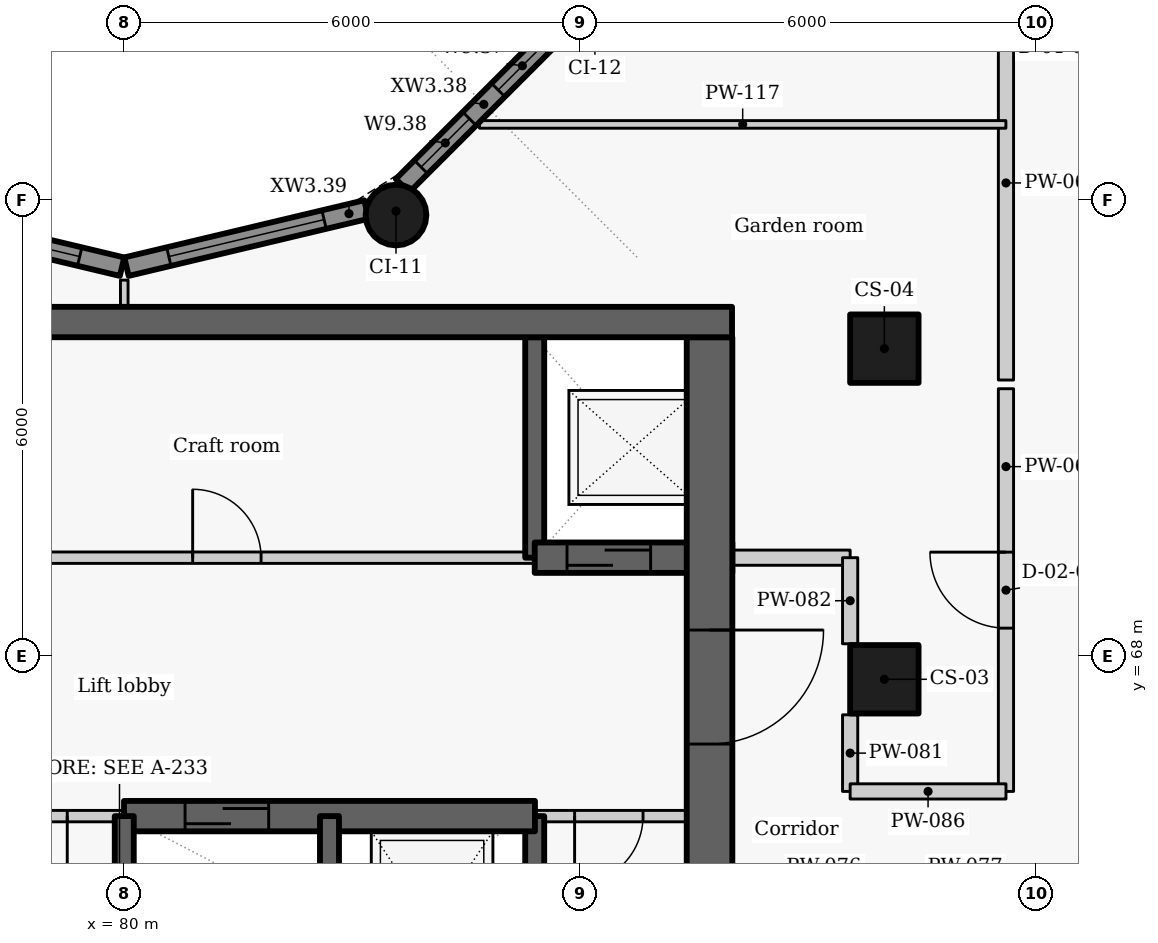
"""IFC4 building model, lengths in metres.
Left out: names, types, materials, properties, quantities, classifications, styles, units other than length and angle.
Written with IfcOpenShell. Run it as: python <this file> out.ifc"""

import sys

from ifc_helpers import new_model, si_unit, direction, frame, frame_2d, origin, origin_2d, place, context, subcontext, project, spatial, rectangle, circle, extrude, element, fill, save


model = new_model("IFC4")
c1 = context("Model", 3, precision=1e-05, world=origin(), true_north=direction((0.0, 1.0)))
c2 = subcontext(c1, "Body", "Model", "MODEL_VIEW")
j1 = project(units=[si_unit("LENGTHUNIT", "METRE"), si_unit("PLANEANGLEUNIT", "RADIAN")], contexts=[c1])
p1 = place(None, origin())
s1 = spatial("IfcSite", under=j1, at=p1, CompositionType="ELEMENT")
p2 = place(p1, origin())
s2 = spatial("IfcBuilding", under=s1, at=p2, CompositionType="ELEMENT")
p3 = place(p2, frame((0.0, 0.0, 183.3)))
s3 = spatial("IfcBuildingStorey", under=s2, at=p3, CompositionType="ELEMENT", Elevation=183.3)
for number, where, z_axis, x_axis in (
    (1, (90.0, 67.7, 0.0), (0.0, 0.0, 1.0), (0.0, 1.0, 0.0)),
    (2, (90.0, 72.05, 0.0), (0.0, 0.0, 1.0), (0.0, 1.0, 0.0)),
):
    element("IfcColumn", number, at=place(p3, frame(where, z_axis=z_axis, x_axis=x_axis)), inside=s3, PredefinedType="COLUMN", context=c2, shape_type="SweptSolid", body=[
        extrude(rectangle(XDim=0.9, YDim=0.9, at=origin_2d()), origin(), (0.0, 0.0, 1.0), 3.3),
    ])
p4 = place(p3, frame((83.575, 73.808, 0.0), z_axis=(0.0, 0.0, 1.0), x_axis=(0.866025403784, 0.5, 0.0)))
e3 = element("IfcColumn", 3, at=p4, inside=s3, PredefinedType="COLUMN", context=c2, shape_type="SweptSolid", body=[
    extrude(circle(Radius=0.4, at=origin_2d()), origin(), (0.0, 0.0, 1.0), 3.3),
])
p5 = place(p3, frame((85.806, 76.339, 0.0), z_axis=(0.0, 0.0, 1.0), x_axis=(-0.707106781187, -0.707106781187, 0.0)))
e4 = element("IfcWall", 4, at=p5, inside=s3, PredefinedType="SOLIDWALL", context=c2, shape_type="SweptSolid", body=[
    extrude(rectangle(XDim=3.033, YDim=0.25, at=frame_2d((1.517, 0.0))), origin(), (0.0, 0.0, 1.0), 2.425),
])
p6 = place(p5, frame((0.353, 0.0, 0.9)))
e5 = element("IfcOpeningElement", 5, at=p6, cuts=e4, PredefinedType="OPENING", context=c2, shape_type="SweptSolid", body=[
    extrude(rectangle(XDim=0.9, YDim=1.1, at=frame_2d((0.45, 0.55))), frame((0.0, 0.135, 0.0), z_axis=(0.0, -1.0, 0.0), x_axis=(1.0, 0.0, 0.0)), (0.0, 0.0, 1.0), 0.27),
])
p7 = place(p5, frame((1.788, 0.0, 0.9)))
e6 = element("IfcOpeningElement", 6, at=p7, cuts=e4, PredefinedType="OPENING", context=c2, shape_type="SweptSolid", body=[
    extrude(rectangle(XDim=0.9, YDim=1.1, at=frame_2d((0.45, 0.55))), frame((0.0, 0.135, 0.0), z_axis=(0.0, -1.0, 0.0), x_axis=(1.0, 0.0, 0.0)), (0.0, 0.0, 1.0), 0.27),
])
p8 = place(p3, frame((83.186, 73.881, 0.0), z_axis=(0.0, 0.0, 1.0), x_axis=(-0.972773113459, -0.231759508395, 0.0)))
e7 = element("IfcWall", 7, at=p8, inside=s3, PredefinedType="SOLIDWALL", context=c2, shape_type="SweptSolid", body=[
    extrude(rectangle(XDim=3.246, YDim=0.25, at=frame_2d((1.623, 0.0))), origin(), (0.0, 0.0, 1.0), 2.425),
])
p9 = place(p8, frame((0.573, 0.0, 0.9)))
e8 = element("IfcOpeningElement", 8, at=p9, cuts=e7, PredefinedType="OPENING", context=c2, shape_type="SweptSolid", body=[
    extrude(rectangle(XDim=2.1, YDim=1.1, at=frame_2d((1.05, 0.55))), frame((0.0, 0.135, 0.0), z_axis=(0.0, -1.0, 0.0), x_axis=(1.0, 0.0, 0.0)), (0.0, 0.0, 1.0), 0.27),
])
p10 = place(p3, frame((79.971, 73.128, 0.0), z_axis=(0.0, 0.0, 1.0), x_axis=(-0.972773113459, 0.231759508395, 0.0)))
e9 = element("IfcWall", 9, at=p10, inside=s3, PredefinedType="SOLIDWALL", context=c2, shape_type="SweptSolid", body=[
    extrude(rectangle(XDim=3.246, YDim=0.25, at=frame_2d((1.623, 0.0))), origin(), (0.0, 0.0, 1.0), 2.425),
])
p11 = place(p10, frame((0.573, 0.0, 0.9)))
e10 = element("IfcOpeningElement", 10, at=p11, cuts=e9, PredefinedType="OPENING", context=c2, shape_type="SweptSolid", body=[
    extrude(rectangle(XDim=2.1, YDim=1.1, at=frame_2d((1.05, 0.55))), frame((0.0, 0.135, 0.0), z_axis=(0.0, -1.0, 0.0), x_axis=(1.0, 0.0, 0.0)), (0.0, 0.0, 1.0), 0.27),
])
p12 = place(p3, frame((72.0, 69.3, 0.0), z_axis=(0.0, 0.0, 1.0), x_axis=(1.0, 0.0, 0.0)))
e11 = element("IfcWall", 11, at=p12, inside=s3, PredefinedType="PARTITIONING", context=c2, shape_type="SweptSolid", body=[
    extrude(rectangle(XDim=13.4, YDim=0.15, at=frame_2d((6.7, 0.0))), origin(), (0.0, 0.0, 1.0), 3.025),
])
p13 = place(p12, frame((1.175, 0.0, 0.0)))
e12 = element("IfcOpeningElement", 12, at=p13, cuts=e11, PredefinedType="OPENING", context=c2, shape_type="SweptSolid", body=[
    extrude(rectangle(XDim=0.9, YDim=2.1, at=frame_2d((0.45, 1.05))), frame((0.0, 0.085, 0.0), z_axis=(0.0, -1.0, 0.0), x_axis=(1.0, 0.0, 0.0)), (0.0, 0.0, 1.0), 0.17),
])
p14 = place(p12, frame((3.5, 0.0, 0.0)))
e13 = element("IfcOpeningElement", 13, at=p14, cuts=e11, PredefinedType="OPENING", context=c2, shape_type="SweptSolid", body=[
    extrude(rectangle(XDim=0.9, YDim=2.1, at=frame_2d((0.45, 1.05))), frame((0.0, 0.085, 0.0), z_axis=(0.0, -1.0, 0.0), x_axis=(1.0, 0.0, 0.0)), (0.0, 0.0, 1.0), 0.17),
])
p15 = place(p12, frame((8.9, 0.0, 0.0)))
e14 = element("IfcOpeningElement", 14, at=p15, cuts=e11, PredefinedType="OPENING", context=c2, shape_type="SweptSolid", body=[
    extrude(rectangle(XDim=0.9, YDim=2.1, at=frame_2d((0.45, 1.05))), frame((0.0, 0.085, 0.0), z_axis=(0.0, -1.0, 0.0), x_axis=(1.0, 0.0, 0.0)), (0.0, 0.0, 1.0), 0.17),
])
p16 = place(p3, frame((85.4, 63.1, -0.275), z_axis=(0.0, 0.0, 1.0), x_axis=(0.0, 1.0, 0.0)))
e15 = element("IfcWall", 15, at=p16, inside=s3, PredefinedType="SHEAR", context=c2, shape_type="SweptSolid", body=[
    extrude(rectangle(XDim=2.8, YDim=0.25, at=frame_2d((1.4, 0.0))), origin(), (0.0, 0.0, 1.0), 3.3),
])
p17 = place(p3, frame((85.4, 69.3, -0.275), z_axis=(0.0, 0.0, 1.0), x_axis=(0.0, 1.0, 0.0)))
e16 = element("IfcWall", 16, at=p17, inside=s3, PredefinedType="SHEAR", context=c2, shape_type="SweptSolid", body=[
    extrude(rectangle(XDim=2.9, YDim=0.25, at=frame_2d((1.45, 0.0))), origin(), (0.0, 0.0, 1.0), 3.3),
])
p18 = place(p3, frame((85.4, 69.3, -0.275), z_axis=(0.0, 0.0, 1.0), x_axis=(1.0, 0.0, 0.0)))
e17 = element("IfcWall", 17, at=p18, inside=s3, PredefinedType="SHEAR", context=c2, shape_type="SweptSolid", body=[
    extrude(rectangle(XDim=2.6, YDim=0.4, at=frame_2d((1.3, 0.0))), origin(), (0.0, 0.0, 1.0), 3.3),
])
p19 = place(p18, frame((0.425, 0.0, 0.275)))
e18 = element("IfcOpeningElement", 18, at=p19, cuts=e17, PredefinedType="OPENING", context=c2, shape_type="SweptSolid", body=[
    extrude(rectangle(XDim=1.1, YDim=2.1, at=frame_2d((0.55, 1.05))), frame((0.0, 0.21, 0.0), z_axis=(0.0, -1.0, 0.0), x_axis=(1.0, 0.0, 0.0)), (0.0, 0.0, 1.0), 0.42),
])
p20 = place(p3, frame((87.7, 72.2, -0.275), z_axis=(0.0, 0.0, 1.0), x_axis=(0.0, -1.0, 0.0)))
e19 = element("IfcWall", 19, at=p20, inside=s3, PredefinedType="SHEAR", context=c2, shape_type="SweptSolid", body=[
    extrude(rectangle(XDim=14.25, YDim=0.6, at=frame_2d((7.125, 0.0))), origin(), (0.0, 0.0, 1.0), 3.3),
])
p21 = place(p20, frame((3.852, 0.0, 0.275)))
e20 = element("IfcOpeningElement", 20, at=p21, cuts=e19, PredefinedType="OPENING", context=c2, shape_type="SweptSolid", body=[
    extrude(rectangle(XDim=1.5, YDim=2.1, at=frame_2d((0.75, 1.05))), frame((0.0, 0.31, 0.0), z_axis=(0.0, -1.0, 0.0), x_axis=(1.0, 0.0, 0.0)), (0.0, 0.0, 1.0), 0.62),
])
p22 = place(p3, frame((80.003, 65.9, 0.0), z_axis=(0.0, 0.0, 1.0), x_axis=(-1.0, 0.0, 0.0)))
e21 = element("IfcWall", 21, at=p22, inside=s3, PredefinedType="PARTITIONING", context=c2, shape_type="SweptSolid", body=[
    extrude(rectangle(XDim=2.706, YDim=0.15, at=frame_2d((1.353, 0.0))), origin(), (0.0, 0.0, 1.0), 3.025),
])
p23 = place(p22, frame((0.753, 0.0, 0.0)))
e22 = element("IfcOpeningElement", 22, at=p23, cuts=e21, PredefinedType="OPENING", context=c2, shape_type="SweptSolid", body=[
    extrude(rectangle(XDim=1.2, YDim=2.1, at=frame_2d((0.6, 1.05))), frame((0.0, 0.085, 0.0), z_axis=(0.0, -1.0, 0.0), x_axis=(1.0, 0.0, 0.0)), (0.0, 0.0, 1.0), 0.17),
])
p24 = place(p3, frame((88.0, 65.9, 0.0), z_axis=(0.0, 0.0, 1.0), x_axis=(-1.0, 0.0, 0.0)))
e23 = element("IfcWall", 23, at=p24, inside=s3, PredefinedType="PARTITIONING", context=c2, shape_type="SweptSolid", body=[
    extrude(rectangle(XDim=2.603, YDim=0.15, at=frame_2d((1.302, 0.0))), origin(), (0.0, 0.0, 1.0), 3.025),
])
p25 = place(p24, frame((1.175, 0.0, 0.0)))
e24 = element("IfcOpeningElement", 24, at=p25, cuts=e23, PredefinedType="OPENING", context=c2, shape_type="SweptSolid", body=[
    extrude(rectangle(XDim=0.9, YDim=2.1, at=frame_2d((0.45, 1.05))), frame((0.0, 0.085, 0.0), z_axis=(0.0, -1.0, 0.0), x_axis=(1.0, 0.0, 0.0)), (0.0, 0.0, 1.0), 0.17),
])
p26 = place(p3, frame((79.997, 65.9, -0.275), z_axis=(0.0, 0.0, 1.0), x_axis=(1.0, 0.0, 0.0)))
e25 = element("IfcWall", 25, at=p26, inside=s3, PredefinedType="SHEAR", context=c2, shape_type="SweptSolid", body=[
    extrude(rectangle(XDim=5.406, YDim=0.4, at=frame_2d((2.703, 0.0))), origin(), (0.0, 0.0, 1.0), 3.3),
])
p27 = place(p26, frame((0.803, 0.0, 0.275)))
e26 = element("IfcOpeningElement", 26, at=p27, cuts=e25, PredefinedType="OPENING", context=c2, shape_type="SweptSolid", body=[
    extrude(rectangle(XDim=1.1, YDim=2.1, at=frame_2d((0.55, 1.05))), frame((0.0, 0.21, 0.0), z_axis=(0.0, -1.0, 0.0), x_axis=(1.0, 0.0, 0.0)), (0.0, 0.0, 1.0), 0.42),
])
for number, where, z_axis, x_axis in (
    (27, (80.0, 63.1, -0.275), (0.0, 0.0, 1.0), (0.0, 1.0, 0.0)),
    (28, (82.7, 63.1, -0.275), (0.0, 0.0, 1.0), (0.0, 1.0, 0.0)),
):
    element("IfcWall", number, at=place(p3, frame(where, z_axis=z_axis, x_axis=x_axis)), inside=s3, PredefinedType="SHEAR", context=c2, shape_type="SweptSolid", body=[
        extrude(rectangle(XDim=2.8, YDim=0.25, at=frame_2d((1.4, 0.0))), origin(), (0.0, 0.0, 1.0), 3.3),
    ])
p28 = place(p3, frame((91.6, 66.225, 0.0), z_axis=(0.0, 0.0, 1.0), x_axis=(0.0, 1.0, 0.0)))
e29 = element("IfcWall", 29, at=p28, inside=s3, PredefinedType="PARTITIONING", context=c2, shape_type="SweptSolid", body=[
    extrude(rectangle(XDim=5.298, YDim=0.2, at=frame_2d((2.649, 0.0))), origin(), (0.0, 0.0, 1.0), 3.025),
])
p29 = place(p28, frame((2.148, 0.0, 0.0)))
e30 = element("IfcOpeningElement", 30, at=p29, cuts=e29, PredefinedType="OPENING", context=c2, shape_type="SweptSolid", body=[
    extrude(rectangle(XDim=1.0, YDim=2.1, at=frame_2d((0.5, 1.05))), frame((0.0, 0.11, 0.0), z_axis=(0.0, -1.0, 0.0), x_axis=(1.0, 0.0, 0.0)), (0.0, 0.0, 1.0), 0.22),
])
p30 = place(p3, frame((91.6, 71.637, 0.0), z_axis=(0.0, 0.0, 1.0), x_axis=(0.0, 1.0, 0.0)))
e31 = element("IfcWall", 31, at=p30, inside=s3, PredefinedType="PARTITIONING", context=c2, shape_type="SweptSolid", body=[
    extrude(rectangle(XDim=5.186, YDim=0.2, at=frame_2d((2.593, 0.0))), origin(), (0.0, 0.0, 1.0), 3.025),
])
p31 = place(p3, frame((88.0, 69.3, 0.0), z_axis=(0.0, 0.0, 1.0), x_axis=(1.0, 0.0, 0.0)))
e32 = element("IfcWall", 32, at=p31, inside=s3, PredefinedType="PARTITIONING", context=c2, shape_type="SweptSolid", body=[
    extrude(rectangle(XDim=1.55, YDim=0.2, at=frame_2d((0.775, 0.0))), origin(), (0.0, 0.0, 1.0), 3.025),
])
p32 = place(p3, frame((89.55, 66.225, 0.0), z_axis=(0.0, 0.0, 1.0), x_axis=(0.0, 1.0, 0.0)))
e33 = element("IfcWall", 33, at=p32, inside=s3, PredefinedType="PARTITIONING", context=c2, shape_type="SweptSolid", body=[
    extrude(rectangle(XDim=1.008, YDim=0.2, at=frame_2d((0.504, 0.0))), origin(), (0.0, 0.0, 1.0), 3.025),
])
p33 = place(p3, frame((89.55, 68.167, 0.0), z_axis=(0.0, 0.0, 1.0), x_axis=(0.0, 1.0, 0.0)))
e34 = element("IfcWall", 34, at=p33, inside=s3, PredefinedType="PARTITIONING", context=c2, shape_type="SweptSolid", body=[
    extrude(rectangle(XDim=1.133, YDim=0.2, at=frame_2d((0.566, 0.0))), origin(), (0.0, 0.0, 1.0), 3.025),
])
p34 = place(p3, frame((89.55, 66.225, 0.0), z_axis=(0.0, 0.0, 1.0), x_axis=(1.0, 0.0, 0.0)))
e35 = element("IfcWall", 35, at=p34, inside=s3, PredefinedType="PARTITIONING", context=c2, shape_type="SweptSolid", body=[
    extrude(rectangle(XDim=2.05, YDim=0.2, at=frame_2d((1.025, 0.0))), origin(), (0.0, 0.0, 1.0), 2.505),
])
p35 = place(p3, frame((80.0, 72.6, 0.0), z_axis=(0.0, 0.0, 1.0), x_axis=(0.0, 1.0, 0.0)))
e36 = element("IfcWall", 36, at=p35, inside=s3, PredefinedType="PARTITIONING", context=c2, shape_type="SweptSolid", body=[
    extrude(rectangle(XDim=0.352, YDim=0.1, at=frame_2d((0.176, 0.0))), origin(), (0.0, 0.0, 1.0), 3.025),
])
p36 = place(p3, frame((84.673, 75.0, 0.0), z_axis=(0.0, 0.0, 1.0), x_axis=(1.0, 0.0, 0.0)))
e37 = element("IfcWall", 37, at=p36, inside=s3, PredefinedType="PARTITIONING", context=c2, shape_type="SweptSolid", body=[
    extrude(rectangle(XDim=6.926, YDim=0.1, at=frame_2d((3.463, 0.0))), origin(), (0.0, 0.0, 1.0), 2.505),
])
p37 = place(p3, frame((72.004, 72.4, -0.275), z_axis=(0.0, 0.0, 1.0), x_axis=(1.0, 0.0, 0.0)))
e38 = element("IfcWall", 38, at=p37, inside=s3, PredefinedType="SHEAR", context=c2, shape_type="SweptSolid", body=[
    extrude(rectangle(XDim=15.992, YDim=0.4, at=frame_2d((7.996, 0.0))), origin(), (0.0, 0.0, 1.0), 3.3),
])
p38 = place(p6, origin())
e39 = element("IfcWindow", 39, at=p38, inside=s3, PartitioningType="SINGLE_PANEL", PredefinedType="WINDOW", context=c2, shape_type="SweptSolid", body=[
    extrude(rectangle(XDim=0.9, YDim=1.1, at=frame_2d((0.45, 0.55))), frame((0.0, 0.03, 0.0), z_axis=(0.0, -1.0, 0.0), x_axis=(1.0, 0.0, 0.0)), (0.0, 0.0, 1.0), 0.06),
])
fill(e5, e39)
p39 = place(p7, origin())
e40 = element("IfcWindow", 40, at=p39, inside=s3, PartitioningType="SINGLE_PANEL", PredefinedType="WINDOW", context=c2, shape_type="SweptSolid", body=[
    extrude(rectangle(XDim=0.9, YDim=1.1, at=frame_2d((0.45, 0.55))), frame((0.0, 0.03, 0.0), z_axis=(0.0, -1.0, 0.0), x_axis=(1.0, 0.0, 0.0)), (0.0, 0.0, 1.0), 0.06),
])
fill(e6, e40)
p40 = place(p9, origin())
e41 = element("IfcWindow", 41, at=p40, inside=s3, PartitioningType="SINGLE_PANEL", PredefinedType="WINDOW", context=c2, shape_type="SweptSolid", body=[
    extrude(rectangle(XDim=2.1, YDim=1.1, at=frame_2d((1.05, 0.55))), frame((0.0, 0.03, 0.0), z_axis=(0.0, -1.0, 0.0), x_axis=(1.0, 0.0, 0.0)), (0.0, 0.0, 1.0), 0.06),
])
fill(e8, e41)
p41 = place(p11, origin())
e42 = element("IfcWindow", 42, at=p41, inside=s3, PartitioningType="SINGLE_PANEL", PredefinedType="WINDOW", context=c2, shape_type="SweptSolid", body=[
    extrude(rectangle(XDim=2.1, YDim=1.1, at=frame_2d((1.05, 0.55))), frame((0.0, 0.03, 0.0), z_axis=(0.0, -1.0, 0.0), x_axis=(1.0, 0.0, 0.0)), (0.0, 0.0, 1.0), 0.06),
])
fill(e10, e42)
p42 = place(p19, origin())
e43 = element("IfcDoor", 43, at=p42, inside=s3, OperationType="SLIDING_TO_LEFT", PredefinedType="DOOR", context=c2, shape_type="SweptSolid", body=[
    extrude(rectangle(XDim=1.1, YDim=2.1, at=frame_2d((0.55, 1.05))), frame((0.0, 0.025, 0.0), z_axis=(0.0, -1.0, 0.0), x_axis=(1.0, 0.0, 0.0)), (0.0, 0.0, 1.0), 0.05),
])
fill(e18, e43)
p43 = place(p15, origin())
e44 = element("IfcDoor", 44, at=p43, inside=s3, OperationType="SINGLE_SWING_LEFT", PredefinedType="DOOR", context=c2, shape_type="SweptSolid", body=[
    extrude(rectangle(XDim=0.9, YDim=2.1, at=frame_2d((0.45, 1.05))), frame((0.0, 0.025, 0.0), z_axis=(0.0, -1.0, 0.0), x_axis=(1.0, 0.0, 0.0)), (0.0, 0.0, 1.0), 0.05),
])
fill(e14, e44)
p44 = place(p23, origin())
e45 = element("IfcDoor", 45, at=p44, inside=s3, OperationType="DOUBLE_DOOR_SINGLE_SWING", PredefinedType="DOOR", context=c2, shape_type="SweptSolid", body=[
    extrude(rectangle(XDim=1.2, YDim=2.1, at=frame_2d((0.6, 1.05))), frame((0.0, 0.025, 0.0), z_axis=(0.0, -1.0, 0.0), x_axis=(1.0, 0.0, 0.0)), (0.0, 0.0, 1.0), 0.05),
])
fill(e22, e45)
p45 = place(p27, origin())
e46 = element("IfcDoor", 46, at=p45, inside=s3, OperationType="SLIDING_TO_LEFT", PredefinedType="DOOR", context=c2, shape_type="SweptSolid", body=[
    extrude(rectangle(XDim=1.1, YDim=2.1, at=frame_2d((0.55, 1.05))), frame((0.0, 0.025, 0.0), z_axis=(0.0, -1.0, 0.0), x_axis=(1.0, 0.0, 0.0)), (0.0, 0.0, 1.0), 0.05),
])
fill(e26, e46)
p46 = place(p25, origin())
e47 = element("IfcDoor", 47, at=p46, inside=s3, OperationType="SINGLE_SWING_RIGHT", PredefinedType="DOOR", context=c2, shape_type="SweptSolid", body=[
    extrude(rectangle(XDim=0.9, YDim=2.1, at=frame_2d((0.45, 1.05))), frame((0.0, 0.025, 0.0), z_axis=(0.0, -1.0, 0.0), x_axis=(1.0, 0.0, 0.0)), (0.0, 0.0, 1.0), 0.05),
])
fill(e24, e47)
p47 = place(p29, origin())
e48 = element("IfcDoor", 48, at=p47, inside=s3, OperationType="SINGLE_SWING_RIGHT", PredefinedType="DOOR", context=c2, shape_type="SweptSolid", body=[
    extrude(rectangle(XDim=1.0, YDim=2.1, at=frame_2d((0.5, 1.05))), frame((0.0, 0.025, 0.0), z_axis=(0.0, -1.0, 0.0), x_axis=(1.0, 0.0, 0.0)), (0.0, 0.0, 1.0), 0.05),
])
fill(e30, e48)
p48 = place(p21, origin())
e49 = element("IfcDoor", 49, at=p48, inside=s3, OperationType="DOUBLE_DOOR_SINGLE_SWING", PredefinedType="DOOR", context=c2, shape_type="SweptSolid", body=[
    extrude(rectangle(XDim=1.5, YDim=2.1, at=frame_2d((0.75, 1.05))), frame((0.0, 0.025, 0.0), z_axis=(0.0, -1.0, 0.0), x_axis=(1.0, 0.0, 0.0)), (0.0, 0.0, 1.0), 0.05),
])
fill(e20, e49)
save(model, sys.argv[1])
